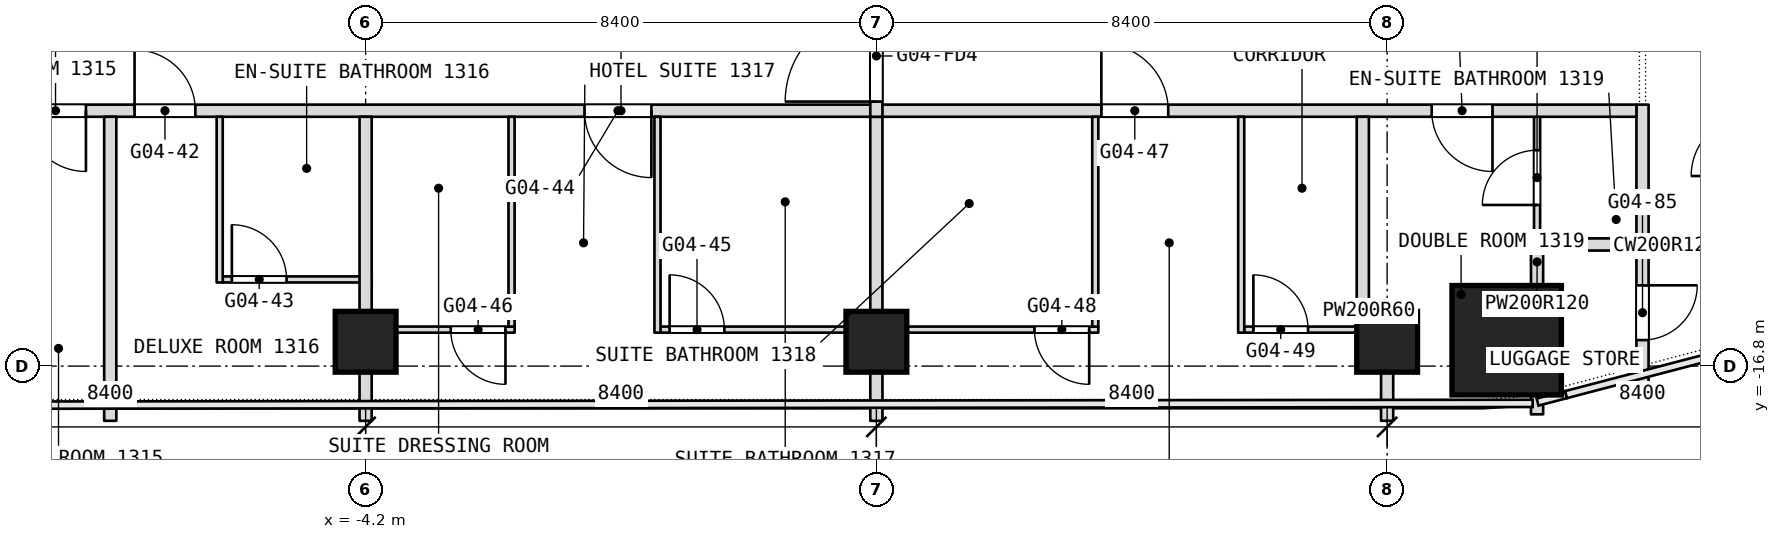
"""IFC4 building model, lengths in metres.
Left out: names, types, materials, properties, quantities, classifications, styles, units other than length and angle.
Written with IfcOpenShell. Run it as: python <this file> out.ifc"""

import sys

from ifc_helpers import new_model, si_unit, direction, frame, frame_2d, origin, origin_2d, place, context, subcontext, project, spatial, rectangle, extrude, element, fill, save


model = new_model("IFC4")
c1 = context("Model", 3, precision=1e-05, world=origin(), true_north=direction((0.0, 1.0)))
c2 = subcontext(c1, "Body", "Model", "MODEL_VIEW")
j1 = project(units=[si_unit("LENGTHUNIT", "METRE"), si_unit("PLANEANGLEUNIT", "RADIAN")], contexts=[c1])
p1 = place(None, origin())
s1 = spatial("IfcSite", under=j1, at=p1, CompositionType="ELEMENT")
p2 = place(p1, origin())
s2 = spatial("IfcBuilding", under=s1, at=p2, CompositionType="ELEMENT")
p3 = place(p2, frame((0.0, 0.0, 61.7)))
s3 = spatial("IfcBuildingStorey", under=s2, at=p3, CompositionType="ELEMENT", Elevation=61.7)
p4 = place(p3, frame((14.566, -16.375, 0.0), z_axis=(0.0, 0.0, 1.0), x_axis=(1.0, 0.0, 0.0)))
e1 = element("IfcColumn", 1, at=p4, inside=s3, PredefinedType="COLUMN", context=c2, shape_type="SweptSolid", body=[
    extrude(rectangle(XDim=1.8, YDim=1.8, at=origin_2d()), origin(), (0.0, 0.0, 1.0), 3.6),
])
for number, where, z_axis, x_axis in (
    (2, (12.6, -16.4, 0.0), (0.0, 0.0, 1.0), (1.0, 0.0, 0.0)),
    (3, (4.2, -16.4, 0.0), (0.0, 0.0, 1.0), (1.0, 0.0, 0.0)),
    (4, (-4.2, -16.4, 0.0), (0.0, 0.0, 1.0), (1.0, 0.0, 0.0)),
):
    element("IfcColumn", number, at=place(p3, frame(where, z_axis=z_axis, x_axis=x_axis)), inside=s3, PredefinedType="COLUMN", context=c2, shape_type="SweptSolid", body=[
        extrude(rectangle(XDim=1.0, YDim=1.0, at=origin_2d()), origin(), (0.0, 0.0, 1.0), 3.6),
    ])
p5 = place(p3, frame((16.8, -17.143, 0.0), z_axis=(0.0, 0.0, 1.0), x_axis=(0.0, 1.0, 0.0)))
e5 = element("IfcWall", 5, at=p5, inside=s3, PredefinedType="PARTITIONING", context=c2, shape_type="SweptSolid", body=[
    extrude(rectangle(XDim=4.643, YDim=0.2, at=frame_2d((2.322, 0.0))), origin(), (0.0, 0.0, 1.0), 3.34),
])
p6 = place(p5, frame((0.771, 0.0, 0.0)))
e6 = element("IfcOpeningElement", 6, at=p6, cuts=e5, PredefinedType="OPENING", context=c2, shape_type="SweptSolid", body=[
    extrude(rectangle(XDim=0.9, YDim=2.1, at=frame_2d((0.45, 1.05))), frame((0.0, 0.1, 0.0), z_axis=(0.0, -1.0, 0.0), x_axis=(1.0, 0.0, 0.0)), (0.0, 0.0, 1.0), 0.2),
])
p7 = place(p3, frame((-4.1, -16.2, 0.0), z_axis=(0.0, 0.0, 1.0), x_axis=(1.0, 0.0, 0.0)))
e7 = element("IfcWall", 7, at=p7, inside=s3, PredefinedType="PARTITIONING", context=c2, shape_type="SweptSolid", body=[
    extrude(rectangle(XDim=2.35, YDim=0.1, at=frame_2d((1.175, 0.0))), origin(), (0.0, 0.0, 1.0), 2.94),
])
p8 = place(p7, frame((1.3, 0.0, 0.0)))
e8 = element("IfcOpeningElement", 8, at=p8, cuts=e7, PredefinedType="OPENING", context=c2, shape_type="SweptSolid", body=[
    extrude(rectangle(XDim=0.9, YDim=2.1, at=frame_2d((0.45, 1.05))), frame((0.0, 0.05, 0.0), z_axis=(0.0, -1.0, 0.0), x_axis=(1.0, 0.0, 0.0)), (0.0, 0.0, 1.0), 0.1),
])
p9 = place(p3, frame((0.65, -16.2, 0.0), z_axis=(0.0, 0.0, 1.0), x_axis=(1.0, 0.0, 0.0)))
e9 = element("IfcWall", 9, at=p9, inside=s3, PredefinedType="PARTITIONING", context=c2, shape_type="SweptSolid", body=[
    extrude(rectangle(XDim=7.2, YDim=0.1, at=frame_2d((3.6, 0.0))), origin(), (0.0, 0.0, 1.0), 2.94),
])
p10 = place(p9, frame((0.15, 0.0, 0.0)))
e10 = element("IfcOpeningElement", 10, at=p10, cuts=e9, PredefinedType="OPENING", context=c2, shape_type="SweptSolid", body=[
    extrude(rectangle(XDim=0.9, YDim=2.1, at=frame_2d((0.45, 1.05))), frame((0.0, 0.05, 0.0), z_axis=(0.0, -1.0, 0.0), x_axis=(1.0, 0.0, 0.0)), (0.0, 0.0, 1.0), 0.1),
])
p11 = place(p9, frame((6.15, 0.0, 0.0)))
e11 = element("IfcOpeningElement", 11, at=p11, cuts=e9, PredefinedType="OPENING", context=c2, shape_type="SweptSolid", body=[
    extrude(rectangle(XDim=0.9, YDim=2.1, at=frame_2d((0.45, 1.05))), frame((0.0, 0.05, 0.0), z_axis=(0.0, -1.0, 0.0), x_axis=(1.0, 0.0, 0.0)), (0.0, 0.0, 1.0), 0.1),
])
p12 = place(p3, frame((10.25, -16.2, 0.0), z_axis=(0.0, 0.0, 1.0), x_axis=(1.0, 0.0, 0.0)))
e12 = element("IfcWall", 12, at=p12, inside=s3, PredefinedType="PARTITIONING", context=c2, shape_type="SweptSolid", body=[
    extrude(rectangle(XDim=2.45, YDim=0.1, at=frame_2d((1.225, 0.0))), origin(), (0.0, 0.0, 1.0), 3.34),
])
p13 = place(p12, frame((0.15, 0.0, 0.0)))
e13 = element("IfcOpeningElement", 13, at=p13, cuts=e12, PredefinedType="OPENING", context=c2, shape_type="SweptSolid", body=[
    extrude(rectangle(XDim=0.9, YDim=2.1, at=frame_2d((0.45, 1.05))), frame((0.0, 0.05, 0.0), z_axis=(0.0, -1.0, 0.0), x_axis=(1.0, 0.0, 0.0)), (0.0, 0.0, 1.0), 0.1),
])
p14 = place(p3, frame((12.1, -15.9, 0.0), z_axis=(0.0, 0.0, 1.0), x_axis=(1.0, 0.0, 0.0)))
e14 = element("IfcWall", 14, at=p14, inside=s3, PredefinedType="PARTITIONING", context=c2, shape_type="SweptSolid", body=[
    extrude(rectangle(XDim=0.4, YDim=0.2, at=frame_2d((0.2, 0.0))), origin(), (0.0, 0.0, 1.0), 3.34),
])
p15 = place(p3, frame((-6.55, -15.375, 0.0), z_axis=(0.0, 0.0, 1.0), x_axis=(1.0, 0.0, 0.0)))
e15 = element("IfcWall", 15, at=p15, inside=s3, PredefinedType="PARTITIONING", context=c2, shape_type="SweptSolid", body=[
    extrude(rectangle(XDim=2.45, YDim=0.1, at=frame_2d((1.225, 0.0))), origin(), (0.0, 0.0, 1.0), 3.34),
])
p16 = place(p15, frame((0.15, 0.0, 0.0)))
e16 = element("IfcOpeningElement", 16, at=p16, cuts=e15, PredefinedType="OPENING", context=c2, shape_type="SweptSolid", body=[
    extrude(rectangle(XDim=0.9, YDim=2.1, at=frame_2d((0.45, 1.05))), frame((0.0, 0.05, 0.0), z_axis=(0.0, -1.0, 0.0), x_axis=(1.0, 0.0, 0.0)), (0.0, 0.0, 1.0), 0.1),
])
p17 = place(p3, frame((15.066, -17.593, 0.0), z_axis=(0.0, 0.0, 1.0), x_axis=(0.0, 1.0, 0.0)))
e17 = element("IfcWall", 17, at=p17, inside=s3, PredefinedType="PARTITIONING", context=c2, shape_type="SweptSolid", body=[
    extrude(rectangle(XDim=0.318, YDim=0.2, at=frame_2d((0.159, 0.0))), origin(), (0.0, 0.0, 1.0), 3.34),
])
p18 = place(p3, frame((15.066, -15.475, 0.0), z_axis=(0.0, 0.0, 1.0), x_axis=(0.0, 1.0, 0.0)))
e18 = element("IfcWall", 18, at=p18, inside=s3, PredefinedType="PARTITIONING", context=c2, shape_type="SweptSolid", body=[
    extrude(rectangle(XDim=0.775, YDim=0.2, at=frame_2d((0.388, 0.0))), origin(), (0.0, 0.0, 1.0), 3.34),
])
p19 = place(p3, frame((15.066, -14.9, 0.0), z_axis=(0.0, 0.0, 1.0), x_axis=(0.0, 1.0, 0.0)))
e19 = element("IfcWall", 19, at=p19, inside=s3, PredefinedType="PARTITIONING", context=c2, shape_type="SweptSolid", body=[
    extrude(rectangle(XDim=2.2, YDim=0.1, at=frame_2d((1.1, 0.0))), origin(), (0.0, 0.0, 1.0), 3.34),
])
p20 = place(p19, frame((0.75, 0.0, 0.0)))
e20 = element("IfcOpeningElement", 20, at=p20, cuts=e19, PredefinedType="OPENING", context=c2, shape_type="SweptSolid", body=[
    extrude(rectangle(XDim=0.9, YDim=2.1, at=frame_2d((0.45, 1.05))), frame((0.0, 0.05, 0.0), z_axis=(0.0, -1.0, 0.0), x_axis=(1.0, 0.0, 0.0)), (0.0, 0.0, 1.0), 0.1),
])
p21 = place(p3, frame((15.116, -14.8, 0.0), z_axis=(0.0, 0.0, 1.0), x_axis=(1.0, 0.0, 0.0)))
e21 = element("IfcWall", 21, at=p21, inside=s3, PredefinedType="PARTITIONING", context=c2, shape_type="SweptSolid", body=[
    extrude(rectangle(XDim=1.584, YDim=0.2, at=frame_2d((0.792, 0.0))), origin(), (0.0, 0.0, 1.0), 3.34),
])
p22 = place(p3, frame((12.6, -17.7, 0.0), z_axis=(0.0, 0.0, 1.0), x_axis=(0.0, 1.0, 0.0)))
e22 = element("IfcWall", 22, at=p22, inside=s3, PredefinedType="PARTITIONING", context=c2, shape_type="SweptSolid", body=[
    extrude(rectangle(XDim=1.9, YDim=0.2, at=frame_2d((0.95, 0.0))), origin(), (0.0, 0.0, 1.0), 3.34),
])
p23 = place(p3, frame((-16.7, -12.6, 0.0), z_axis=(0.0, 0.0, 1.0), x_axis=(1.0, 0.0, 0.0)))
e23 = element("IfcWall", 23, at=p23, inside=s3, PredefinedType="PARTITIONING", context=c2, shape_type="SweptSolid", body=[
    extrude(rectangle(XDim=33.4, YDim=0.2, at=frame_2d((16.7, 0.0))), origin(), (0.0, 0.0, 1.0), 3.34),
])
p24 = place(p23, frame((6.9, 0.0, 0.0)))
e24 = element("IfcOpeningElement", 24, at=p24, cuts=e23, PredefinedType="OPENING", context=c2, shape_type="SweptSolid", body=[
    extrude(rectangle(XDim=1.0, YDim=2.1, at=frame_2d((0.5, 1.05))), frame((0.0, 0.1, 0.0), z_axis=(0.0, -1.0, 0.0), x_axis=(1.0, 0.0, 0.0)), (0.0, 0.0, 1.0), 0.2),
])
p25 = place(p23, frame((8.7, 0.0, 0.0)))
e25 = element("IfcOpeningElement", 25, at=p25, cuts=e23, PredefinedType="OPENING", context=c2, shape_type="SweptSolid", body=[
    extrude(rectangle(XDim=1.0, YDim=2.1, at=frame_2d((0.5, 1.05))), frame((0.0, 0.1, 0.0), z_axis=(0.0, -1.0, 0.0), x_axis=(1.0, 0.0, 0.0)), (0.0, 0.0, 1.0), 0.2),
])
p26 = place(p23, frame((16.1, 0.0, 0.0)))
e26 = element("IfcOpeningElement", 26, at=p26, cuts=e23, PredefinedType="OPENING", context=c2, shape_type="SweptSolid", body=[
    extrude(rectangle(XDim=1.1, YDim=2.1, at=frame_2d((0.55, 1.05))), frame((0.0, 0.1, 0.0), z_axis=(0.0, -1.0, 0.0), x_axis=(1.0, 0.0, 0.0)), (0.0, 0.0, 1.0), 0.2),
])
p27 = place(p23, frame((24.6, 0.0, 0.0)))
e27 = element("IfcOpeningElement", 27, at=p27, cuts=e23, PredefinedType="OPENING", context=c2, shape_type="SweptSolid", body=[
    extrude(rectangle(XDim=1.1, YDim=2.1, at=frame_2d((0.55, 1.05))), frame((0.0, 0.1, 0.0), z_axis=(0.0, -1.0, 0.0), x_axis=(1.0, 0.0, 0.0)), (0.0, 0.0, 1.0), 0.2),
])
p28 = place(p23, frame((2.317, 0.0, 0.0)))
e28 = element("IfcOpeningElement", 28, at=p28, cuts=e23, PredefinedType="OPENING", context=c2, shape_type="SweptSolid", body=[
    extrude(rectangle(XDim=1.0, YDim=2.1, at=frame_2d((0.5, 1.05))), frame((0.0, 0.1, 0.0), z_axis=(0.0, -1.0, 0.0), x_axis=(1.0, 0.0, 0.0)), (0.0, 0.0, 1.0), 0.2),
])
p29 = place(p23, frame((30.033, 0.0, 0.0)))
e29 = element("IfcOpeningElement", 29, at=p29, cuts=e23, PredefinedType="OPENING", context=c2, shape_type="SweptSolid", body=[
    extrude(rectangle(XDim=1.0, YDim=2.1, at=frame_2d((0.5, 1.05))), frame((0.0, 0.1, 0.0), z_axis=(0.0, -1.0, 0.0), x_axis=(1.0, 0.0, 0.0)), (0.0, 0.0, 1.0), 0.2),
])
p30 = place(p3, frame((12.2, -15.8, 0.0), z_axis=(0.0, 0.0, 1.0), x_axis=(0.0, 1.0, 0.0)))
e30 = element("IfcWall", 30, at=p30, inside=s3, PredefinedType="PARTITIONING", context=c2, shape_type="SweptSolid", body=[
    extrude(rectangle(XDim=3.1, YDim=0.2, at=frame_2d((1.55, 0.0))), origin(), (0.0, 0.0, 1.0), 3.34),
])
p31 = place(p3, frame((10.2, -16.25, 0.0), z_axis=(0.0, 0.0, 1.0), x_axis=(0.0, 1.0, 0.0)))
e31 = element("IfcWall", 31, at=p31, inside=s3, PredefinedType="PARTITIONING", context=c2, shape_type="SweptSolid", body=[
    extrude(rectangle(XDim=3.55, YDim=0.1, at=frame_2d((1.775, 0.0))), origin(), (0.0, 0.0, 1.0), 3.34),
])
p32 = place(p3, frame((7.8, -16.15, 0.0), z_axis=(0.0, 0.0, 1.0), x_axis=(0.0, 1.0, 0.0)))
e32 = element("IfcWall", 32, at=p32, inside=s3, PredefinedType="PARTITIONING", context=c2, shape_type="SweptSolid", body=[
    extrude(rectangle(XDim=3.45, YDim=0.1, at=frame_2d((1.725, 0.0))), origin(), (0.0, 0.0, 1.0), 3.34),
])
p33 = place(p3, frame((4.2, -17.7, 0.0), z_axis=(0.0, 0.0, 1.0), x_axis=(0.0, 1.0, 0.0)))
e33 = element("IfcWall", 33, at=p33, inside=s3, PredefinedType="PARTITIONING", context=c2, shape_type="SweptSolid", body=[
    extrude(rectangle(XDim=5.0, YDim=0.2, at=frame_2d((2.5, 0.0))), origin(), (0.0, 0.0, 1.0), 3.34),
])
p34 = place(p3, frame((4.2, -12.7, 0.0), z_axis=(0.0, 0.0, 1.0), x_axis=(0.0, 1.0, 0.0)))
e34 = element("IfcWall", 34, at=p34, inside=s3, PredefinedType="PARTITIONING", context=c2, shape_type="SweptSolid", body=[
    extrude(rectangle(XDim=12.7, YDim=0.2, at=frame_2d((6.35, 0.0))), origin(), (0.0, 0.0, 1.0), 3.34),
])
p35 = place(p34, frame((11.05, 0.0, 0.0)))
e35 = element("IfcOpeningElement", 35, at=p35, cuts=e34, PredefinedType="OPENING", context=c2, shape_type="SweptSolid", body=[
    extrude(rectangle(XDim=1.5, YDim=2.1, at=frame_2d((0.75, 1.05))), frame((0.0, 0.1, 0.0), z_axis=(0.0, -1.0, 0.0), x_axis=(1.0, 0.0, 0.0)), (0.0, 0.0, 1.0), 0.2),
])
p36 = place(p34, frame((0.25, 0.0, 0.0)))
e36 = element("IfcOpeningElement", 36, at=p36, cuts=e34, PredefinedType="OPENING", context=c2, shape_type="SweptSolid", body=[
    extrude(rectangle(XDim=1.5, YDim=2.1, at=frame_2d((0.75, 1.05))), frame((0.0, 0.1, 0.0), z_axis=(0.0, -1.0, 0.0), x_axis=(1.0, 0.0, 0.0)), (0.0, 0.0, 1.0), 0.2),
])
p37 = place(p3, frame((0.6, -16.25, 0.0), z_axis=(0.0, 0.0, 1.0), x_axis=(0.0, 1.0, 0.0)))
e37 = element("IfcWall", 37, at=p37, inside=s3, PredefinedType="PARTITIONING", context=c2, shape_type="SweptSolid", body=[
    extrude(rectangle(XDim=3.55, YDim=0.1, at=frame_2d((1.775, 0.0))), origin(), (0.0, 0.0, 1.0), 3.34),
])
p38 = place(p3, frame((-1.8, -16.15, 0.0), z_axis=(0.0, 0.0, 1.0), x_axis=(0.0, 1.0, 0.0)))
e38 = element("IfcWall", 38, at=p38, inside=s3, PredefinedType="PARTITIONING", context=c2, shape_type="SweptSolid", body=[
    extrude(rectangle(XDim=3.45, YDim=0.1, at=frame_2d((1.725, 0.0))), origin(), (0.0, 0.0, 1.0), 3.34),
])
p39 = place(p3, frame((-4.2, -17.7, 0.0), z_axis=(0.0, 0.0, 1.0), x_axis=(0.0, 1.0, 0.0)))
e39 = element("IfcWall", 39, at=p39, inside=s3, PredefinedType="PARTITIONING", context=c2, shape_type="SweptSolid", body=[
    extrude(rectangle(XDim=5.0, YDim=0.2, at=frame_2d((2.5, 0.0))), origin(), (0.0, 0.0, 1.0), 3.34),
])
p40 = place(p3, frame((-6.6, -15.425, 0.0), z_axis=(0.0, 0.0, 1.0), x_axis=(0.0, 1.0, 0.0)))
e40 = element("IfcWall", 40, at=p40, inside=s3, PredefinedType="PARTITIONING", context=c2, shape_type="SweptSolid", body=[
    extrude(rectangle(XDim=2.725, YDim=0.1, at=frame_2d((1.363, 0.0))), origin(), (0.0, 0.0, 1.0), 3.34),
])
p41 = place(p3, frame((-8.4, -17.7, 0.0), z_axis=(0.0, 0.0, 1.0), x_axis=(0.0, 1.0, 0.0)))
e41 = element("IfcWall", 41, at=p41, inside=s3, PredefinedType="PARTITIONING", context=c2, shape_type="SweptSolid", body=[
    extrude(rectangle(XDim=5.0, YDim=0.2, at=frame_2d((2.5, 0.0))), origin(), (0.0, 0.0, 1.0), 3.34),
])
p42 = place(p6, origin())
e42 = element("IfcDoor", 42, at=p42, inside=s3, OperationType="SINGLE_SWING_RIGHT", PredefinedType="DOOR", context=c2, shape_type="SweptSolid", body=[
    extrude(rectangle(XDim=0.9, YDim=2.1, at=frame_2d((0.45, 1.05))), frame((0.0, 0.025, 0.0), z_axis=(0.0, -1.0, 0.0), x_axis=(1.0, 0.0, 0.0)), (0.0, 0.0, 1.0), 0.05),
])
fill(e6, e42)
p43 = place(p8, origin())
e43 = element("IfcDoor", 43, at=p43, inside=s3, OperationType="SINGLE_SWING_RIGHT", PredefinedType="DOOR", context=c2, shape_type="SweptSolid", body=[
    extrude(rectangle(XDim=0.9, YDim=2.1, at=frame_2d((0.45, 1.05))), frame((0.0, 0.025, 0.0), z_axis=(0.0, -1.0, 0.0), x_axis=(1.0, 0.0, 0.0)), (0.0, 0.0, 1.0), 0.05),
])
fill(e8, e43)
p44 = place(p10, origin())
e44 = element("IfcDoor", 44, at=p44, inside=s3, OperationType="SINGLE_SWING_LEFT", PredefinedType="DOOR", context=c2, shape_type="SweptSolid", body=[
    extrude(rectangle(XDim=0.9, YDim=2.1, at=frame_2d((0.45, 1.05))), frame((0.0, 0.025, 0.0), z_axis=(0.0, -1.0, 0.0), x_axis=(1.0, 0.0, 0.0)), (0.0, 0.0, 1.0), 0.05),
])
fill(e10, e44)
p45 = place(p11, origin())
e45 = element("IfcDoor", 45, at=p45, inside=s3, OperationType="SINGLE_SWING_RIGHT", PredefinedType="DOOR", context=c2, shape_type="SweptSolid", body=[
    extrude(rectangle(XDim=0.9, YDim=2.1, at=frame_2d((0.45, 1.05))), frame((0.0, 0.025, 0.0), z_axis=(0.0, -1.0, 0.0), x_axis=(1.0, 0.0, 0.0)), (0.0, 0.0, 1.0), 0.05),
])
fill(e11, e45)
p46 = place(p13, origin())
e46 = element("IfcDoor", 46, at=p46, inside=s3, OperationType="SINGLE_SWING_LEFT", PredefinedType="DOOR", context=c2, shape_type="SweptSolid", body=[
    extrude(rectangle(XDim=0.9, YDim=2.1, at=frame_2d((0.45, 1.05))), frame((0.0, 0.025, 0.0), z_axis=(0.0, -1.0, 0.0), x_axis=(1.0, 0.0, 0.0)), (0.0, 0.0, 1.0), 0.05),
])
fill(e13, e46)
p47 = place(p16, origin())
e47 = element("IfcDoor", 47, at=p47, inside=s3, OperationType="SINGLE_SWING_LEFT", PredefinedType="DOOR", context=c2, shape_type="SweptSolid", body=[
    extrude(rectangle(XDim=0.9, YDim=2.1, at=frame_2d((0.45, 1.05))), frame((0.0, 0.025, 0.0), z_axis=(0.0, -1.0, 0.0), x_axis=(1.0, 0.0, 0.0)), (0.0, 0.0, 1.0), 0.05),
])
fill(e16, e47)
p48 = place(p20, origin())
e48 = element("IfcDoor", 48, at=p48, inside=s3, OperationType="SINGLE_SWING_RIGHT", PredefinedType="DOOR", context=c2, shape_type="SweptSolid", body=[
    extrude(rectangle(XDim=0.9, YDim=2.1, at=frame_2d((0.45, 1.05))), frame((0.0, 0.025, 0.0), z_axis=(0.0, -1.0, 0.0), x_axis=(1.0, 0.0, 0.0)), (0.0, 0.0, 1.0), 0.05),
])
fill(e20, e48)
p49 = place(p24, origin())
e49 = element("IfcDoor", 49, at=p49, inside=s3, OperationType="SINGLE_SWING_RIGHT", PredefinedType="DOOR", context=c2, shape_type="SweptSolid", body=[
    extrude(rectangle(XDim=1.0, YDim=2.1, at=frame_2d((0.5, 1.05))), frame((0.0, 0.025, 0.0), z_axis=(0.0, -1.0, 0.0), x_axis=(1.0, 0.0, 0.0)), (0.0, 0.0, 1.0), 0.05),
])
fill(e24, e49)
p50 = place(p25, origin())
e50 = element("IfcDoor", 50, at=p50, inside=s3, OperationType="SINGLE_SWING_RIGHT", PredefinedType="DOOR", context=c2, shape_type="SweptSolid", body=[
    extrude(rectangle(XDim=1.0, YDim=2.1, at=frame_2d((0.5, 1.05))), frame((0.0, 0.025, 0.0), z_axis=(0.0, -1.0, 0.0), x_axis=(1.0, 0.0, 0.0)), (0.0, 0.0, 1.0), 0.05),
])
fill(e25, e50)
p51 = place(p26, origin())
e51 = element("IfcDoor", 51, at=p51, inside=s3, OperationType="SINGLE_SWING_LEFT", PredefinedType="DOOR", context=c2, shape_type="SweptSolid", body=[
    extrude(rectangle(XDim=1.1, YDim=2.1, at=frame_2d((0.55, 1.05))), frame((0.0, 0.025, 0.0), z_axis=(0.0, -1.0, 0.0), x_axis=(1.0, 0.0, 0.0)), (0.0, 0.0, 1.0), 0.05),
])
fill(e26, e51)
p52 = place(p27, origin())
e52 = element("IfcDoor", 52, at=p52, inside=s3, OperationType="SINGLE_SWING_RIGHT", PredefinedType="DOOR", context=c2, shape_type="SweptSolid", body=[
    extrude(rectangle(XDim=1.1, YDim=2.1, at=frame_2d((0.55, 1.05))), frame((0.0, 0.025, 0.0), z_axis=(0.0, -1.0, 0.0), x_axis=(1.0, 0.0, 0.0)), (0.0, 0.0, 1.0), 0.05),
])
fill(e27, e52)
p53 = place(p29, origin())
e53 = element("IfcDoor", 53, at=p53, inside=s3, OperationType="SINGLE_SWING_LEFT", PredefinedType="DOOR", context=c2, shape_type="SweptSolid", body=[
    extrude(rectangle(XDim=1.0, YDim=2.1, at=frame_2d((0.5, 1.05))), frame((0.0, 0.025, 0.0), z_axis=(0.0, -1.0, 0.0), x_axis=(1.0, 0.0, 0.0)), (0.0, 0.0, 1.0), 0.05),
])
fill(e29, e53)
p54 = place(p36, origin())
e54 = element("IfcDoor", 54, at=p54, inside=s3, OperationType="DOUBLE_DOOR_DOUBLE_SWING", PredefinedType="DOOR", context=c2, shape_type="SweptSolid", body=[
    extrude(rectangle(XDim=1.5, YDim=2.1, at=frame_2d((0.75, 1.05))), frame((0.0, 0.025, 0.0), z_axis=(0.0, -1.0, 0.0), x_axis=(1.0, 0.0, 0.0)), (0.0, 0.0, 1.0), 0.05),
])
fill(e36, e54)
save(model, sys.argv[1])
